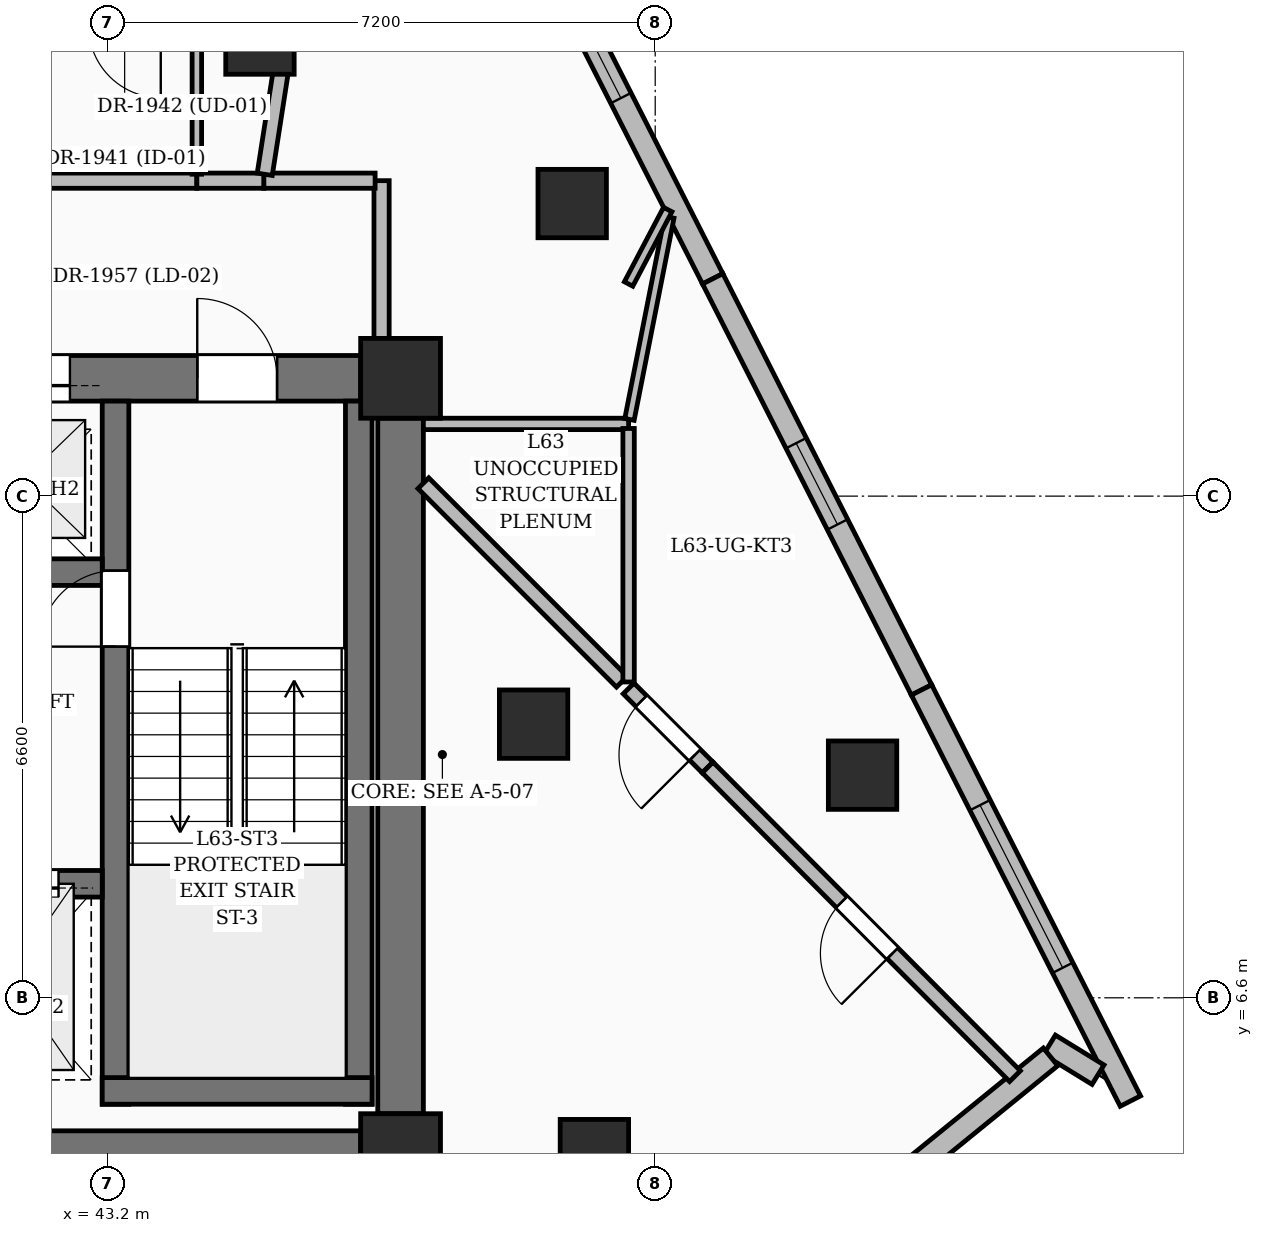
"""IFC4 building model, lengths in metres.
Left out: names, types, materials, properties, quantities, classifications, styles, units other than length and angle.
Written with IfcOpenShell. Run it as: python <this file> out.ifc"""

import sys

from ifc_helpers import new_model, si_unit, direction, frame, frame_2d, origin, origin_2d, place, context, subcontext, project, spatial, rectangle, extrude, element, fill, save


model = new_model("IFC4")
c1 = context("Model", 3, precision=1e-05, world=origin(), true_north=direction((0.0, 1.0)))
c2 = subcontext(c1, "Body", "Model", "MODEL_VIEW")
j1 = project(units=[si_unit("LENGTHUNIT", "METRE"), si_unit("PLANEANGLEUNIT", "RADIAN")], contexts=[c1])
p1 = place(None, origin())
s1 = spatial("IfcSite", under=j1, at=p1, CompositionType="ELEMENT")
p2 = place(p1, origin())
s2 = spatial("IfcBuilding", under=s1, at=p2, CompositionType="ELEMENT")
p3 = place(p2, frame((0.0, 0.0, 244.5)))
s3 = spatial("IfcBuildingStorey", under=s2, at=p3, CompositionType="ELEMENT", Elevation=244.5)
for number, where, z_axis, x_axis in (
    (1, (47.05, 4.55, 0.0), (0.0, 0.0, 1.0), (1.0, 0.0, 0.0)),
    (2, (47.05, 14.75, 0.0), (0.0, 0.0, 1.0), (1.0, 0.0, 0.0)),
):
    element("IfcColumn", number, at=place(p3, frame(where, z_axis=z_axis, x_axis=x_axis)), inside=s3, PredefinedType="COLUMN", context=c2, shape_type="SweptSolid", body=[
        extrude(rectangle(XDim=1.05, YDim=1.05, at=origin_2d()), origin(), (0.0, 0.0, 1.0), 3.75),
    ])
for number, where, z_axis, x_axis in (
    (3, (49.6, 4.55, 0.0), (0.0, 0.0, 1.0), (1.0, 0.0, 0.0)),
    (4, (48.8, 10.2, 0.0), (0.0, 0.0, 1.0), (1.0, 0.0, 0.0)),
    (5, (45.2, 19.2, 0.0), (0.0, 0.0, 1.0), (1.0, 0.0, 0.0)),
):
    element("IfcColumn", number, at=place(p3, frame(where, z_axis=z_axis, x_axis=x_axis)), inside=s3, PredefinedType="COLUMN", context=c2, shape_type="SweptSolid", body=[
        extrude(rectangle(XDim=0.9, YDim=0.9, at=origin_2d()), origin(), (0.0, 0.0, 1.0), 3.75),
    ])
p4 = place(p3, frame((35.675, 4.55, 0.0), z_axis=(0.0, 0.0, 1.0), x_axis=(1.0, 0.0, 0.0)))
e6 = element("IfcWall", 6, at=p4, inside=s3, PredefinedType="SHEAR", context=c2, shape_type="SweptSolid", body=[
    extrude(rectangle(XDim=10.85, YDim=0.6, at=frame_2d((5.425, 0.0))), origin(), (0.0, 0.0, 1.0), 3.75),
])
p5 = place(p3, frame((35.675, 14.75, 0.0), z_axis=(0.0, 0.0, 1.0), x_axis=(1.0, 0.0, 0.0)))
e7 = element("IfcWall", 7, at=p5, inside=s3, PredefinedType="SHEAR", context=c2, shape_type="SweptSolid", body=[
    extrude(rectangle(XDim=10.85, YDim=0.6, at=frame_2d((5.425, 0.0))), origin(), (0.0, 0.0, 1.0), 3.75),
])
p6 = place(p5, frame((1.1, 0.0, 0.0)))
e8 = element("IfcOpeningElement", 8, at=p6, cuts=e7, PredefinedType="OPENING", context=c2, shape_type="SweptSolid", body=[
    extrude(rectangle(XDim=1.05, YDim=2.15, at=frame_2d((0.525, 1.075))), frame((0.0, 0.31, 0.0), z_axis=(0.0, -1.0, 0.0), x_axis=(1.0, 0.0, 0.0)), (0.0, 0.0, 1.0), 0.62),
])
p7 = place(p5, frame((8.7, 0.0, 0.0)))
e9 = element("IfcOpeningElement", 9, at=p7, cuts=e7, PredefinedType="OPENING", context=c2, shape_type="SweptSolid", body=[
    extrude(rectangle(XDim=1.05, YDim=2.15, at=frame_2d((0.525, 1.075))), frame((0.0, 0.31, 0.0), z_axis=(0.0, -1.0, 0.0), x_axis=(1.0, 0.0, 0.0)), (0.0, 0.0, 1.0), 0.62),
])
p8 = place(p5, frame((3.825, 0.0, 0.0)))
e10 = element("IfcOpeningElement", 10, at=p8, cuts=e7, PredefinedType="OPENING", context=c2, shape_type="SweptSolid", body=[
    extrude(rectangle(XDim=1.2, YDim=2.2, at=frame_2d((0.6, 1.1))), frame((0.0, 0.31, 0.0), z_axis=(0.0, -1.0, 0.0), x_axis=(1.0, 0.0, 0.0)), (0.0, 0.0, 1.0), 0.62),
])
p9 = place(p5, frame((5.825, 0.0, 0.0)))
e11 = element("IfcOpeningElement", 11, at=p9, cuts=e7, PredefinedType="OPENING", context=c2, shape_type="SweptSolid", body=[
    extrude(rectangle(XDim=1.2, YDim=2.2, at=frame_2d((0.6, 1.1))), frame((0.0, 0.31, 0.0), z_axis=(0.0, -1.0, 0.0), x_axis=(1.0, 0.0, 0.0)), (0.0, 0.0, 1.0), 0.62),
])
p10 = place(p3, frame((47.05, 5.075, 0.0), z_axis=(0.0, 0.0, 1.0), x_axis=(0.0, 1.0, 0.0)))
e12 = element("IfcWall", 12, at=p10, inside=s3, PredefinedType="SHEAR", context=c2, shape_type="SweptSolid", body=[
    extrude(rectangle(XDim=9.15, YDim=0.6, at=frame_2d((4.575, 0.0))), origin(), (0.0, 0.0, 1.0), 3.75),
])
p11 = place(p3, frame((43.3, 5.2, 0.0), z_axis=(0.0, 0.0, 1.0), x_axis=(0.0, 1.0, 0.0)))
e13 = element("IfcWall", 13, at=p11, inside=s3, PredefinedType="SOLIDWALL", context=c2, shape_type="SweptSolid", body=[
    extrude(rectangle(XDim=9.25, YDim=0.35, at=frame_2d((4.625, 0.0))), origin(), (0.0, 0.0, 1.0), 3.75),
])
p12 = place(p11, frame((6.02, 0.0, 0.0)))
e14 = element("IfcOpeningElement", 14, at=p12, cuts=e13, PredefinedType="OPENING", context=c2, shape_type="SweptSolid", body=[
    extrude(rectangle(XDim=1.0, YDim=2.15, at=frame_2d((0.5, 1.075))), frame((0.0, 0.185, 0.0), z_axis=(0.0, -1.0, 0.0), x_axis=(1.0, 0.0, 0.0)), (0.0, 0.0, 1.0), 0.37),
])
p13 = place(p3, frame((46.5, 5.2, 0.0), z_axis=(0.0, 0.0, 1.0), x_axis=(0.0, 1.0, 0.0)))
e15 = element("IfcWall", 15, at=p13, inside=s3, PredefinedType="SOLIDWALL", context=c2, shape_type="SweptSolid", body=[
    extrude(rectangle(XDim=9.25, YDim=0.35, at=frame_2d((4.625, 0.0))), origin(), (0.0, 0.0, 1.0), 3.75),
])
p14 = place(p3, frame((43.125, 5.375, 0.0), z_axis=(0.0, 0.0, 1.0), x_axis=(1.0, 0.0, 0.0)))
e16 = element("IfcWall", 16, at=p14, inside=s3, PredefinedType="SOLIDWALL", context=c2, shape_type="SweptSolid", body=[
    extrude(rectangle(XDim=3.55, YDim=0.35, at=frame_2d((1.775, 0.0))), origin(), (0.0, 0.0, 1.0), 3.75),
])
p15 = place(p3, frame((40.55, 8.1, 0.0), z_axis=(0.0, 0.0, 1.0), x_axis=(1.0, 0.0, 0.0)))
e17 = element("IfcWall", 17, at=p15, inside=s3, PredefinedType="SOLIDWALL", context=c2, shape_type="SweptSolid", body=[
    extrude(rectangle(XDim=2.575, YDim=0.35, at=frame_2d((1.288, 0.0))), origin(), (0.0, 0.0, 1.0), 3.75),
])
p16 = place(p15, frame((0.7, 0.0, 0.0)))
e18 = element("IfcOpeningElement", 18, at=p16, cuts=e17, PredefinedType="OPENING", context=c2, shape_type="SweptSolid", body=[
    extrude(rectangle(XDim=1.3, YDim=2.25, at=frame_2d((0.65, 1.125))), frame((0.0, 0.185, 0.0), z_axis=(0.0, -1.0, 0.0), x_axis=(1.0, 0.0, 0.0)), (0.0, 0.0, 1.0), 0.37),
])
p17 = place(p3, frame((39.075, 12.2, 0.0), z_axis=(0.0, 0.0, 1.0), x_axis=(1.0, 0.0, 0.0)))
e19 = element("IfcWall", 19, at=p17, inside=s3, PredefinedType="SOLIDWALL", context=c2, shape_type="SweptSolid", body=[
    extrude(rectangle(XDim=4.05, YDim=0.35, at=frame_2d((2.025, 0.0))), origin(), (0.0, 0.0, 1.0), 3.75),
])
for number, where, z_axis, x_axis in (
    (20, (53.128, 9.529, 0.0), (0.0, 0.0, 1.0), (1.0, 0.0, 0.0)),
    (21, (49.308, 17.049, 0.0), (0.0, 0.0, 1.0), (1.0, 0.0, 0.0)),
):
    element("IfcColumn", number, at=place(p3, frame(where, z_axis=z_axis, x_axis=x_axis)), inside=s3, PredefinedType="COLUMN", context=c2, shape_type="SweptSolid", body=[
        extrude(rectangle(XDim=0.9, YDim=0.9, at=origin_2d()), origin(), (0.0, 0.0, 1.0), 3.75),
    ])
p18 = place(p3, frame((48.533, 21.223, 0.0), z_axis=(0.0, 0.0, 1.0), x_axis=(0.452886731337, -0.891568061664, 0.0)))
e22 = element("IfcWall", 22, at=p18, inside=s3, PredefinedType="SOLIDWALL", context=c2, shape_type="SweptSolid", body=[
    extrude(rectangle(XDim=5.792, YDim=0.3, at=frame_2d((2.896, 0.0))), origin(), (0.0, 0.0, 1.0), 3.5),
])
p19 = place(p18, frame((1.625, 0.0, 0.6)))
e23 = element("IfcOpeningElement", 23, at=p19, cuts=e22, PredefinedType="OPENING", context=c2, shape_type="SweptSolid", body=[
    extrude(rectangle(XDim=1.5, YDim=2.1, at=frame_2d((0.75, 1.05))), frame((0.0, 0.16, 0.0), z_axis=(0.0, -1.0, 0.0), x_axis=(1.0, 0.0, 0.0)), (0.0, 0.0, 1.0), 0.32),
])
p20 = place(p3, frame((51.156, 16.059, 0.0), z_axis=(0.0, 0.0, 1.0), x_axis=(0.452903032275, -0.891559781146, 0.0)))
e24 = element("IfcWall", 24, at=p20, inside=s3, PredefinedType="SOLIDWALL", context=c2, shape_type="SweptSolid", body=[
    extrude(rectangle(XDim=6.067, YDim=0.3, at=frame_2d((3.033, 0.0))), origin(), (0.0, 0.0, 1.0), 3.5),
])
p21 = place(p20, frame((2.425, 0.0, 0.8)))
e25 = element("IfcOpeningElement", 25, at=p21, cuts=e24, PredefinedType="OPENING", context=c2, shape_type="SweptSolid", body=[
    extrude(rectangle(XDim=1.2, YDim=1.8, at=frame_2d((0.6, 0.9))), frame((0.0, 0.16, 0.0), z_axis=(0.0, -1.0, 0.0), x_axis=(1.0, 0.0, 0.0)), (0.0, 0.0, 1.0), 0.32),
])
p22 = place(p3, frame((53.904, 10.65, 0.0), z_axis=(0.0, 0.0, 1.0), x_axis=(0.452886782758, -0.891568035544, 0.0)))
e26 = element("IfcWall", 26, at=p22, inside=s3, PredefinedType="SOLIDWALL", context=c2, shape_type="SweptSolid", body=[
    extrude(rectangle(XDim=6.067, YDim=0.3, at=frame_2d((3.033, 0.0))), origin(), (0.0, 0.0, 1.0), 3.5),
])
p23 = place(p22, frame((1.7, 0.0, 0.6)))
e27 = element("IfcOpeningElement", 27, at=p23, cuts=e26, PredefinedType="OPENING", context=c2, shape_type="SweptSolid", body=[
    extrude(rectangle(XDim=2.4, YDim=2.1, at=frame_2d((1.2, 1.05))), frame((0.0, 0.16, 0.0), z_axis=(0.0, -1.0, 0.0), x_axis=(1.0, 0.0, 0.0)), (0.0, 0.0, 1.0), 0.32),
])
p24 = place(p3, frame((56.226, 5.588, 0.0), z_axis=(0.0, 0.0, 1.0), x_axis=(-0.851959856167, 0.523607107935, 0.0)))
e28 = element("IfcWall", 28, at=p24, inside=s3, PredefinedType="SOLIDWALL", context=c2, shape_type="SweptSolid", body=[
    extrude(rectangle(XDim=0.75, YDim=0.3, at=frame_2d((0.375, 0.0))), origin(), (0.0, 0.0, 1.0), 3.5),
])
p25 = place(p3, frame((55.601, 5.823, 0.0), z_axis=(0.0, 0.0, 1.0), x_axis=(-0.775969517168, -0.630770408648, 0.0)))
e29 = element("IfcWall", 29, at=p25, inside=s3, PredefinedType="SOLIDWALL", context=c2, shape_type="SweptSolid", body=[
    extrude(rectangle(XDim=2.223, YDim=0.3, at=frame_2d((1.111, 0.0))), origin(), (0.0, 0.0, 1.0), 3.5),
])
p26 = place(p3, frame((46.8, 15.05, 0.0), z_axis=(0.0, 0.0, 1.0), x_axis=(0.0, 1.0, 0.0)))
e30 = element("IfcWall", 30, at=p26, inside=s3, PredefinedType="PARTITIONING", context=c2, shape_type="SweptSolid", body=[
    extrude(rectangle(XDim=2.3, YDim=0.2, at=frame_2d((1.15, 0.0))), origin(), (0.0, 0.0, 1.0), 2.685),
])
p27 = place(p3, frame((46.715, 17.35, 0.0), z_axis=(0.0, 0.0, 1.0), x_axis=(-1.0, 0.0, 0.0)))
e31 = element("IfcWall", 31, at=p27, inside=s3, PredefinedType="PARTITIONING", context=c2, shape_type="SweptSolid", body=[
    extrude(rectangle(XDim=1.465, YDim=0.2, at=frame_2d((0.732, 0.0))), origin(), (0.0, 0.0, 1.0), 2.685),
])
p28 = place(p3, frame((44.37, 17.35, 0.0), z_axis=(0.0, 0.0, 1.0), x_axis=(-1.0, 0.0, 0.0)))
e32 = element("IfcWall", 32, at=p28, inside=s3, PredefinedType="PARTITIONING", context=c2, shape_type="SweptSolid", body=[
    extrude(rectangle(XDim=6.17, YDim=0.2, at=frame_2d((3.085, 0.0))), origin(), (0.0, 0.0, 1.0), 3.5),
])
p29 = place(p28, frame((2.525, 0.0, 0.0)))
e33 = element("IfcOpeningElement", 33, at=p29, cuts=e32, PredefinedType="OPENING", context=c2, shape_type="SweptSolid", body=[
    extrude(rectangle(XDim=1.0, YDim=2.2, at=frame_2d((0.5, 1.1))), frame((0.0, 0.11, 0.0), z_axis=(0.0, -1.0, 0.0), x_axis=(1.0, 0.0, 0.0)), (0.0, 0.0, 1.0), 0.22),
])
p30 = place(p3, frame((45.25, 17.35, 0.0), z_axis=(0.0, 0.0, 1.0), x_axis=(-1.0, 0.0, 0.0)))
e34 = element("IfcWall", 34, at=p30, inside=s3, PredefinedType="PARTITIONING", context=c2, shape_type="SweptSolid", body=[
    extrude(rectangle(XDim=0.88, YDim=0.2, at=frame_2d((0.44, 0.0))), origin(), (0.0, 0.0, 1.0), 3.5),
])
p31 = place(p3, frame((49.962, 10.758, 0.0), z_axis=(0.0, 0.0, 1.0), x_axis=(-0.707073730319, 0.707139830509, 0.0)))
e35 = element("IfcWall", 35, at=p31, inside=s3, PredefinedType="PARTITIONING", context=c2, shape_type="SweptSolid", body=[
    extrude(rectangle(XDim=3.694, YDim=0.2, at=frame_2d((1.847, 0.0))), origin(), (0.0, 0.0, 1.0), 3.5),
])
p32 = place(p3, frame((51.09, 9.63, 0.0), z_axis=(0.0, 0.0, 1.0), x_axis=(-0.707106781187, 0.707106781187, 0.0)))
e36 = element("IfcWall", 36, at=p32, inside=s3, PredefinedType="PARTITIONING", context=c2, shape_type="SweptSolid", body=[
    extrude(rectangle(XDim=1.471, YDim=0.2, at=frame_2d((0.735, 0.0))), origin(), (0.0, 0.0, 1.0), 2.764),
])
p33 = place(p32, frame((0.235, 0.0, 0.0)))
e37 = element("IfcOpeningElement", 37, at=p33, cuts=e36, PredefinedType="OPENING", context=c2, shape_type="SweptSolid", body=[
    extrude(rectangle(XDim=1.0, YDim=2.2, at=frame_2d((0.5, 1.1))), frame((0.0, 0.11, 0.0), z_axis=(0.0, -1.0, 0.0), x_axis=(1.0, 0.0, 0.0)), (0.0, 0.0, 1.0), 0.22),
])
p34 = place(p3, frame((55.133, 5.569, 0.0), z_axis=(0.0, 0.0, 1.0), x_axis=(-0.70554996404, 0.708660178254, 0.0)))
e38 = element("IfcWall", 38, at=p34, inside=s3, PredefinedType="PARTITIONING", context=c2, shape_type="SweptSolid", body=[
    extrude(rectangle(XDim=5.73, YDim=0.2, at=frame_2d((2.865, 0.0))), origin(), (0.0, 0.0, 1.0), 2.764),
])
p35 = place(p34, frame((2.281, 0.0, 0.0)))
e39 = element("IfcOpeningElement", 39, at=p35, cuts=e38, PredefinedType="OPENING", context=c2, shape_type="SweptSolid", body=[
    extrude(rectangle(XDim=0.95, YDim=2.2, at=frame_2d((0.475, 1.1))), frame((0.0, 0.11, 0.0), z_axis=(0.0, -1.0, 0.0), x_axis=(1.0, 0.0, 0.0)), (0.0, 0.0, 1.0), 0.22),
])
p36 = place(p3, frame((47.35, 14.15, 0.0), z_axis=(0.0, 0.0, 1.0), x_axis=(1.0, 0.0, 0.0)))
e40 = element("IfcWall", 40, at=p36, inside=s3, PredefinedType="PARTITIONING", context=c2, shape_type="SweptSolid", body=[
    extrude(rectangle(XDim=2.7, YDim=0.15, at=frame_2d((1.35, 0.0))), origin(), (0.0, 0.0, 1.0), 2.862),
])
p37 = place(p3, frame((50.061, 14.209, 0.0), z_axis=(0.0, 0.0, 1.0), x_axis=(0.193465351017, 0.9811071083, 0.0)))
e41 = element("IfcWall", 41, at=p37, inside=s3, PredefinedType="PARTITIONING", context=c2, shape_type="SweptSolid", body=[
    extrude(rectangle(XDim=2.711, YDim=0.125, at=frame_2d((1.355, 0.0))), origin(), (0.0, 0.0, 1.0), 2.82),
])
p38 = place(p3, frame((45.916, 21.629, 0.0), z_axis=(0.0, 0.0, 1.0), x_axis=(-0.153776880835, -0.98810559705, 0.0)))
e42 = element("IfcWall", 42, at=p38, inside=s3, PredefinedType="PARTITIONING", context=c2, shape_type="SweptSolid", body=[
    extrude(rectangle(XDim=4.245, YDim=0.2, at=frame_2d((2.123, 0.0))), origin(), (0.0, 0.0, 1.0), 2.685),
])
p39 = place(p3, frame((50.05, 10.755, 0.0), z_axis=(0.0, 0.0, 1.0), x_axis=(0.0, 1.0, 0.0)))
e43 = element("IfcWall", 43, at=p39, inside=s3, PredefinedType="PARTITIONING", context=c2, shape_type="SweptSolid", body=[
    extrude(rectangle(XDim=3.335, YDim=0.15, at=frame_2d((1.667, 0.0))), origin(), (0.0, 0.0, 1.0), 2.862),
])
p40 = place(p3, frame((44.37, 17.435, 0.0), z_axis=(0.0, 0.0, 1.0), x_axis=(0.0, 1.0, 0.0)))
e44 = element("IfcWall", 44, at=p40, inside=s3, PredefinedType="PARTITIONING", context=c2, shape_type="SweptSolid", body=[
    extrude(rectangle(XDim=1.955, YDim=0.125, at=frame_2d((0.978, 0.0))), origin(), (0.0, 0.0, 1.0), 3.5),
])
p41 = place(p3, frame((50.05, 15.991, 0.0), z_axis=(0.0, 0.0, 1.0), x_axis=(0.465482610459, 0.88505702605, 0.0)))
e45 = element("IfcWall", 45, at=p41, inside=s3, PredefinedType="PARTITIONING", context=c2, shape_type="SweptSolid", body=[
    extrude(rectangle(XDim=1.106, YDim=0.125, at=frame_2d((0.553, 0.0))), origin(), (0.0, 0.0, 1.0), 2.82),
])
p42 = place(p19, origin())
e46 = element("IfcWindow", 46, at=p42, inside=s3, PartitioningType="SINGLE_PANEL", PredefinedType="WINDOW", context=c2, shape_type="SweptSolid", body=[
    extrude(rectangle(XDim=1.5, YDim=2.1, at=frame_2d((0.75, 1.05))), frame((0.0, 0.03, 0.0), z_axis=(0.0, -1.0, 0.0), x_axis=(1.0, 0.0, 0.0)), (0.0, 0.0, 1.0), 0.06),
])
fill(e23, e46)
p43 = place(p21, origin())
e47 = element("IfcWindow", 47, at=p43, inside=s3, PartitioningType="SINGLE_PANEL", PredefinedType="WINDOW", context=c2, shape_type="SweptSolid", body=[
    extrude(rectangle(XDim=1.2, YDim=1.8, at=frame_2d((0.6, 0.9))), frame((0.0, 0.03, 0.0), z_axis=(0.0, -1.0, 0.0), x_axis=(1.0, 0.0, 0.0)), (0.0, 0.0, 1.0), 0.06),
])
fill(e25, e47)
p44 = place(p23, origin())
e48 = element("IfcWindow", 48, at=p44, inside=s3, PartitioningType="SINGLE_PANEL", PredefinedType="WINDOW", context=c2, shape_type="SweptSolid", body=[
    extrude(rectangle(XDim=2.4, YDim=2.1, at=frame_2d((1.2, 1.05))), frame((0.0, 0.03, 0.0), z_axis=(0.0, -1.0, 0.0), x_axis=(1.0, 0.0, 0.0)), (0.0, 0.0, 1.0), 0.06),
])
fill(e27, e48)
p45 = place(p7, origin())
e49 = element("IfcDoor", 49, at=p45, inside=s3, OperationType="SINGLE_SWING_LEFT", PredefinedType="DOOR", context=c2, shape_type="SweptSolid", body=[
    extrude(rectangle(XDim=1.05, YDim=2.15, at=frame_2d((0.525, 1.075))), frame((0.0, 0.025, 0.0), z_axis=(0.0, -1.0, 0.0), x_axis=(1.0, 0.0, 0.0)), (0.0, 0.0, 1.0), 0.05),
])
fill(e9, e49)
p46 = place(p12, origin())
e50 = element("IfcDoor", 50, at=p46, inside=s3, OperationType="SINGLE_SWING_LEFT", PredefinedType="DOOR", context=c2, shape_type="SweptSolid", body=[
    extrude(rectangle(XDim=1.0, YDim=2.15, at=frame_2d((0.5, 1.075))), frame((0.0, 0.025, 0.0), z_axis=(0.0, -1.0, 0.0), x_axis=(1.0, 0.0, 0.0)), (0.0, 0.0, 1.0), 0.05),
])
fill(e14, e50)
p47 = place(p16, origin())
e51 = element("IfcDoor", 51, at=p47, inside=s3, OperationType="DOUBLE_DOOR_SLIDING", PredefinedType="DOOR", context=c2, shape_type="SweptSolid", body=[
    extrude(rectangle(XDim=1.3, YDim=2.25, at=frame_2d((0.65, 1.125))), frame((0.0, 0.025, 0.0), z_axis=(0.0, -1.0, 0.0), x_axis=(1.0, 0.0, 0.0)), (0.0, 0.0, 1.0), 0.05),
])
fill(e18, e51)
p48 = place(p9, origin())
e52 = element("IfcDoor", 52, at=p48, inside=s3, OperationType="DOUBLE_DOOR_SLIDING", PredefinedType="DOOR", context=c2, shape_type="SweptSolid", body=[
    extrude(rectangle(XDim=1.2, YDim=2.2, at=frame_2d((0.6, 1.1))), frame((0.0, 0.025, 0.0), z_axis=(0.0, -1.0, 0.0), x_axis=(1.0, 0.0, 0.0)), (0.0, 0.0, 1.0), 0.05),
])
fill(e11, e52)
p49 = place(p33, origin())
e53 = element("IfcDoor", 53, at=p49, inside=s3, OperationType="SINGLE_SWING_LEFT", PredefinedType="DOOR", context=c2, shape_type="SweptSolid", body=[
    extrude(rectangle(XDim=1.0, YDim=2.2, at=frame_2d((0.5, 1.1))), frame((0.0, 0.025, 0.0), z_axis=(0.0, -1.0, 0.0), x_axis=(1.0, 0.0, 0.0)), (0.0, 0.0, 1.0), 0.05),
])
fill(e37, e53)
p50 = place(p35, origin())
e54 = element("IfcDoor", 54, at=p50, inside=s3, OperationType="SINGLE_SWING_LEFT", PredefinedType="DOOR", context=c2, shape_type="SweptSolid", body=[
    extrude(rectangle(XDim=0.95, YDim=2.2, at=frame_2d((0.475, 1.1))), frame((0.0, 0.025, 0.0), z_axis=(0.0, -1.0, 0.0), x_axis=(1.0, 0.0, 0.0)), (0.0, 0.0, 1.0), 0.05),
])
fill(e39, e54)
save(model, sys.argv[1])
